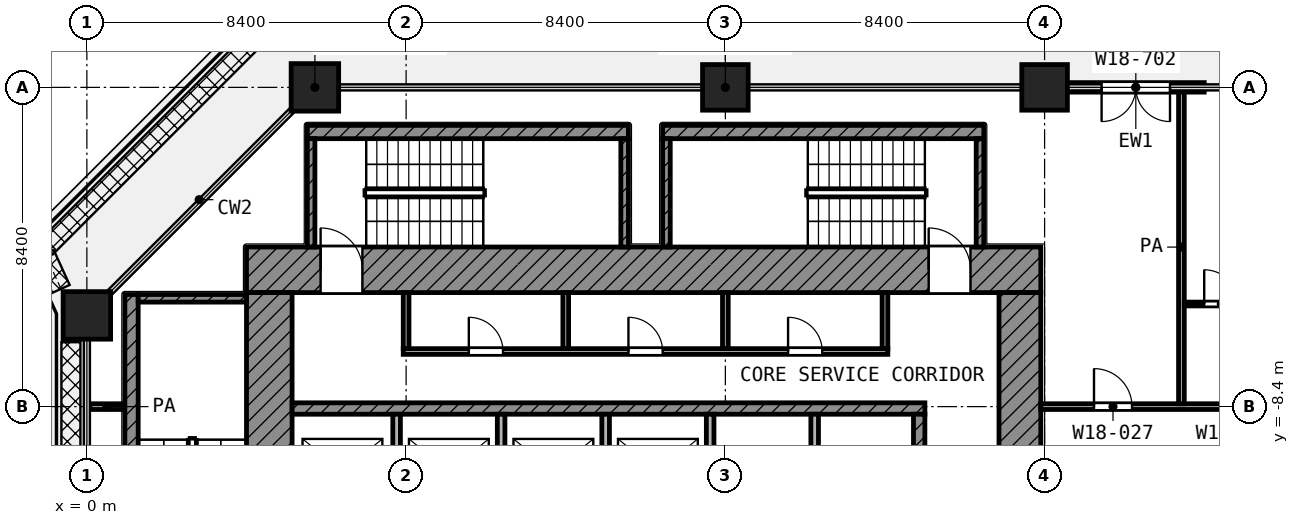
"""IFC4 building model, lengths in metres.
Left out: names, types, materials, properties, quantities, classifications, styles, units other than length and angle.
Written with IfcOpenShell. Run it as: python <this file> out.ifc"""

import sys

from ifc_helpers import new_model, si_unit, direction, frame, frame_2d, origin, origin_2d, place, context, subcontext, project, spatial, rectangle, extrude, element, fill, save


model = new_model("IFC4")
c1 = context("Model", 3, precision=1e-05, world=origin(), true_north=direction((0.0, 1.0)))
c2 = subcontext(c1, "Body", "Model", "MODEL_VIEW")
j1 = project(units=[si_unit("LENGTHUNIT", "METRE"), si_unit("PLANEANGLEUNIT", "RADIAN")], contexts=[c1])
p1 = place(None, origin())
s1 = spatial("IfcSite", under=j1, at=p1, CompositionType="ELEMENT")
p2 = place(p1, origin())
s2 = spatial("IfcBuilding", under=s1, at=p2, CompositionType="ELEMENT")
p3 = place(p2, frame((0.0, 0.0, 81.2)))
s3 = spatial("IfcBuildingStorey", under=s2, at=p3, CompositionType="ELEMENT", Elevation=81.2)
p4 = place(p3, frame((6.0, 0.0, 0.0), z_axis=(0.0, 0.0, 1.0), x_axis=(1.0, 0.0, 0.0)))
e1 = element("IfcColumn", 1, at=p4, inside=s3, PredefinedType="COLUMN", context=c2, shape_type="SweptSolid", body=[
    extrude(rectangle(XDim=1.25, YDim=1.25, at=origin_2d()), origin(), (0.0, 0.0, 1.0), 4.2),
])
for number, where, z_axis, x_axis in (
    (2, (16.8, 0.0, 0.0), (0.0, 0.0, 1.0), (1.0, 0.0, 0.0)),
    (3, (25.2, 0.0, 0.0), (0.0, 0.0, 1.0), (1.0, 0.0, 0.0)),
):
    element("IfcColumn", number, at=place(p3, frame(where, z_axis=z_axis, x_axis=x_axis)), inside=s3, PredefinedType="COLUMN", context=c2, shape_type="SweptSolid", body=[
        extrude(rectangle(XDim=1.2, YDim=1.2, at=origin_2d()), origin(), (0.0, 0.0, 1.0), 4.2),
    ])
p5 = place(p3, frame((0.0, -6.0, 0.0), z_axis=(0.0, 0.0, 1.0), x_axis=(1.0, 0.0, 0.0)))
e4 = element("IfcColumn", 4, at=p5, inside=s3, PredefinedType="COLUMN", context=c2, shape_type="SweptSolid", body=[
    extrude(rectangle(XDim=1.25, YDim=1.25, at=origin_2d()), origin(), (0.0, 0.0, 1.0), 4.2),
])
p6 = place(p3, frame((29.4, 0.0, 0.0), z_axis=(0.0, 0.0, 1.0), x_axis=(-1.0, 0.0, 0.0)))
e5 = element("IfcWall", 5, at=p6, inside=s3, PredefinedType="SOLIDWALL", context=c2, shape_type="SweptSolid", body=[
    extrude(rectangle(XDim=3.6, YDim=0.25, at=frame_2d((1.8, 0.0))), origin(), (0.0, 0.0, 1.0), 3.78),
])
p7 = place(p6, frame((0.9, 0.0, 0.0)))
e6 = element("IfcOpeningElement", 6, at=p7, cuts=e5, PredefinedType="OPENING", context=c2, shape_type="SweptSolid", body=[
    extrude(rectangle(XDim=1.8, YDim=2.1, at=frame_2d((0.9, 1.05))), frame((0.0, 0.135, 0.0), z_axis=(0.0, -1.0, 0.0), x_axis=(1.0, 0.0, 0.0)), (0.0, 0.0, 1.0), 0.27),
])
p8 = place(p3, frame((4.2, -4.8, 0.0), z_axis=(0.0, 0.0, 1.0), x_axis=(1.0, 0.0, 0.0)))
e7 = element("IfcWall", 7, at=p8, inside=s3, PredefinedType="SHEAR", context=c2, shape_type="SweptSolid", body=[
    extrude(rectangle(XDim=20.9, YDim=1.2, at=frame_2d((10.45, 0.0))), origin(), (0.0, 0.0, 1.0), 3.9),
])
p9 = place(p8, frame((1.95, 0.0, 0.0)))
e8 = element("IfcOpeningElement", 8, at=p9, cuts=e7, PredefinedType="OPENING", context=c2, shape_type="SweptSolid", body=[
    extrude(rectangle(XDim=1.1, YDim=2.1, at=frame_2d((0.55, 1.05))), frame((0.0, 0.61, 0.0), z_axis=(0.0, -1.0, 0.0), x_axis=(1.0, 0.0, 0.0)), (0.0, 0.0, 1.0), 1.22),
])
p10 = place(p8, frame((17.95, 0.0, 0.0)))
e9 = element("IfcOpeningElement", 9, at=p10, cuts=e7, PredefinedType="OPENING", context=c2, shape_type="SweptSolid", body=[
    extrude(rectangle(XDim=1.1, YDim=2.1, at=frame_2d((0.55, 1.05))), frame((0.0, 0.61, 0.0), z_axis=(0.0, -1.0, 0.0), x_axis=(1.0, 0.0, 0.0)), (0.0, 0.0, 1.0), 1.22),
])
p11 = place(p3, frame((4.8, -25.1, 0.0), z_axis=(0.0, 0.0, 1.0), x_axis=(0.0, 1.0, 0.0)))
e10 = element("IfcWall", 10, at=p11, inside=s3, PredefinedType="SHEAR", context=c2, shape_type="SweptSolid", body=[
    extrude(rectangle(XDim=19.7, YDim=1.2, at=frame_2d((9.85, 0.0))), origin(), (0.0, 0.0, 1.0), 3.9),
])
p12 = place(p11, frame((11.55, 0.0, 0.0)))
e11 = element("IfcOpeningElement", 11, at=p12, cuts=e10, PredefinedType="OPENING", context=c2, shape_type="SweptSolid", body=[
    extrude(rectangle(XDim=1.1, YDim=2.1, at=frame_2d((0.55, 1.05))), frame((0.0, 0.61, 0.0), z_axis=(0.0, -1.0, 0.0), x_axis=(1.0, 0.0, 0.0)), (0.0, 0.0, 1.0), 1.22),
])
p13 = place(p11, frame((2.25, 0.0, 0.0)))
e12 = element("IfcOpeningElement", 12, at=p13, cuts=e10, PredefinedType="OPENING", context=c2, shape_type="SweptSolid", body=[
    extrude(rectangle(XDim=1.1, YDim=2.1, at=frame_2d((0.55, 1.05))), frame((0.0, 0.61, 0.0), z_axis=(0.0, -1.0, 0.0), x_axis=(1.0, 0.0, 0.0)), (0.0, 0.0, 1.0), 1.22),
])
p14 = place(p3, frame((24.55, -24.0, 0.0), z_axis=(0.0, 0.0, 1.0), x_axis=(0.0, 1.0, 0.0)))
e13 = element("IfcWall", 13, at=p14, inside=s3, PredefinedType="SHEAR", context=c2, shape_type="SweptSolid", body=[
    extrude(rectangle(XDim=18.6, YDim=1.1, at=frame_2d((9.3, 0.0))), origin(), (0.0, 0.0, 1.0), 3.9),
])
p15 = place(p14, frame((10.5, 0.0, 0.0)))
e14 = element("IfcOpeningElement", 14, at=p15, cuts=e13, PredefinedType="OPENING", context=c2, shape_type="SweptSolid", body=[
    extrude(rectangle(XDim=1.8, YDim=2.1, at=frame_2d((0.9, 1.05))), frame((0.0, 0.56, 0.0), z_axis=(0.0, -1.0, 0.0), x_axis=(1.0, 0.0, 0.0)), (0.0, 0.0, 1.0), 1.12),
])
p16 = place(p3, frame((5.4, -8.45, 0.0), z_axis=(0.0, 0.0, 1.0), x_axis=(1.0, 0.0, 0.0)))
e15 = element("IfcWall", 15, at=p16, inside=s3, PredefinedType="SHEAR", context=c2, shape_type="SweptSolid", body=[
    extrude(rectangle(XDim=16.65, YDim=0.3, at=frame_2d((8.325, 0.0))), origin(), (0.0, 0.0, 1.0), 3.9),
])
p17 = place(p3, frame((21.9, -10.95, 0.0), z_axis=(0.0, 0.0, 1.0), x_axis=(0.0, 1.0, 0.0)))
e16 = element("IfcWall", 16, at=p17, inside=s3, PredefinedType="SHEAR", context=c2, shape_type="SweptSolid", body=[
    extrude(rectangle(XDim=2.35, YDim=0.3, at=frame_2d((1.175, 0.0))), origin(), (0.0, 0.0, 1.0), 3.9),
])
for number, where, z_axis, x_axis in (
    (17, (8.15, -10.95, 0.0), (0.0, 0.0, 1.0), (0.0, 1.0, 0.0)),
    (18, (10.9, -10.95, 0.0), (0.0, 0.0, 1.0), (0.0, 1.0, 0.0)),
    (19, (13.65, -10.95, 0.0), (0.0, 0.0, 1.0), (0.0, 1.0, 0.0)),
    (20, (16.4, -10.95, 0.0), (0.0, 0.0, 1.0), (0.0, 1.0, 0.0)),
    (21, (19.15, -10.95, 0.0), (0.0, 0.0, 1.0), (0.0, 1.0, 0.0)),
):
    element("IfcWall", number, at=place(p3, frame(where, z_axis=z_axis, x_axis=x_axis)), inside=s3, PredefinedType="PARTITIONING", context=c2, shape_type="SweptSolid", body=[
        extrude(rectangle(XDim=2.35, YDim=0.2, at=frame_2d((1.175, 0.0))), origin(), (0.0, 0.0, 1.0), 3.9),
    ])
p18 = place(p3, frame((8.325, -6.95, 0.0), z_axis=(0.0, 0.0, 1.0), x_axis=(1.0, 0.0, 0.0)))
e22 = element("IfcWall", 22, at=p18, inside=s3, PredefinedType="PARTITIONING", context=c2, shape_type="SweptSolid", body=[
    extrude(rectangle(XDim=12.75, YDim=0.15, at=frame_2d((6.375, 0.0))), origin(), (0.0, 0.0, 1.0), 3.9),
])
p19 = place(p18, frame((1.725, 0.0, 0.0)))
e23 = element("IfcOpeningElement", 23, at=p19, cuts=e22, PredefinedType="OPENING", context=c2, shape_type="SweptSolid", body=[
    extrude(rectangle(XDim=0.9, YDim=2.1, at=frame_2d((0.45, 1.05))), frame((0.0, 0.085, 0.0), z_axis=(0.0, -1.0, 0.0), x_axis=(1.0, 0.0, 0.0)), (0.0, 0.0, 1.0), 0.17),
])
p20 = place(p18, frame((5.925, 0.0, 0.0)))
e24 = element("IfcOpeningElement", 24, at=p20, cuts=e22, PredefinedType="OPENING", context=c2, shape_type="SweptSolid", body=[
    extrude(rectangle(XDim=0.9, YDim=2.1, at=frame_2d((0.45, 1.05))), frame((0.0, 0.085, 0.0), z_axis=(0.0, -1.0, 0.0), x_axis=(1.0, 0.0, 0.0)), (0.0, 0.0, 1.0), 0.17),
])
p21 = place(p18, frame((10.125, 0.0, 0.0)))
e25 = element("IfcOpeningElement", 25, at=p21, cuts=e22, PredefinedType="OPENING", context=c2, shape_type="SweptSolid", body=[
    extrude(rectangle(XDim=0.9, YDim=2.1, at=frame_2d((0.45, 1.05))), frame((0.0, 0.085, 0.0), z_axis=(0.0, -1.0, 0.0), x_axis=(1.0, 0.0, 0.0)), (0.0, 0.0, 1.0), 0.17),
])
for number, where, z_axis, x_axis in (
    (26, (8.4, -6.875, 0.0), (0.0, 0.0, 1.0), (0.0, 1.0, 0.0)),
    (27, (12.6, -6.875, 0.0), (0.0, 0.0, 1.0), (0.0, 1.0, 0.0)),
    (28, (16.8, -6.875, 0.0), (0.0, 0.0, 1.0), (0.0, 1.0, 0.0)),
    (29, (21.0, -6.875, 0.0), (0.0, 0.0, 1.0), (0.0, 1.0, 0.0)),
):
    element("IfcWall", number, at=place(p3, frame(where, z_axis=z_axis, x_axis=x_axis)), inside=s3, PredefinedType="PARTITIONING", context=c2, shape_type="SweptSolid", body=[
        extrude(rectangle(XDim=1.475, YDim=0.15, at=frame_2d((0.738, 0.0))), origin(), (0.0, 0.0, 1.0), 3.9),
    ])
p22 = place(p3, frame((1.175, -13.9, 0.0), z_axis=(0.0, 0.0, 1.0), x_axis=(0.0, 1.0, 0.0)))
e30 = element("IfcWall", 30, at=p22, inside=s3, PredefinedType="SHEAR", context=c2, shape_type="SweptSolid", body=[
    extrude(rectangle(XDim=8.45, YDim=0.35, at=frame_2d((4.225, 0.0))), origin(), (0.0, 0.0, 1.0), 3.9),
])
p23 = place(p3, frame((1.35, -5.55, 0.0), z_axis=(0.0, 0.0, 1.0), x_axis=(1.0, 0.0, 0.0)))
e31 = element("IfcWall", 31, at=p23, inside=s3, PredefinedType="SHEAR", context=c2, shape_type="SweptSolid", body=[
    extrude(rectangle(XDim=2.85, YDim=0.2, at=frame_2d((1.425, 0.0))), origin(), (0.0, 0.0, 1.0), 3.9),
])
p24 = place(p3, frame((5.8, -1.175, 0.0), z_axis=(0.0, 0.0, 1.0), x_axis=(1.0, 0.0, 0.0)))
e32 = element("IfcWall", 32, at=p24, inside=s3, PredefinedType="SHEAR", context=c2, shape_type="SweptSolid", body=[
    extrude(rectangle(XDim=8.45, YDim=0.35, at=frame_2d((4.225, 0.0))), origin(), (0.0, 0.0, 1.0), 3.9),
])
for number, where, z_axis, x_axis in (
    (33, (5.9, -4.2, 0.0), (0.0, 0.0, 1.0), (0.0, 1.0, 0.0)),
    (34, (14.15, -4.2, 0.0), (0.0, 0.0, 1.0), (0.0, 1.0, 0.0)),
):
    element("IfcWall", number, at=place(p3, frame(where, z_axis=z_axis, x_axis=x_axis)), inside=s3, PredefinedType="SHEAR", context=c2, shape_type="SweptSolid", body=[
        extrude(rectangle(XDim=2.85, YDim=0.2, at=frame_2d((1.425, 0.0))), origin(), (0.0, 0.0, 1.0), 3.9),
    ])
p25 = place(p3, frame((15.15, -1.175, 0.0), z_axis=(0.0, 0.0, 1.0), x_axis=(1.0, 0.0, 0.0)))
e35 = element("IfcWall", 35, at=p25, inside=s3, PredefinedType="SHEAR", context=c2, shape_type="SweptSolid", body=[
    extrude(rectangle(XDim=8.45, YDim=0.35, at=frame_2d((4.225, 0.0))), origin(), (0.0, 0.0, 1.0), 3.9),
])
for number, where, z_axis, x_axis in (
    (36, (15.25, -4.2, 0.0), (0.0, 0.0, 1.0), (0.0, 1.0, 0.0)),
    (37, (23.5, -4.2, 0.0), (0.0, 0.0, 1.0), (0.0, 1.0, 0.0)),
):
    element("IfcWall", number, at=place(p3, frame(where, z_axis=z_axis, x_axis=x_axis)), inside=s3, PredefinedType="SHEAR", context=c2, shape_type="SweptSolid", body=[
        extrude(rectangle(XDim=2.85, YDim=0.2, at=frame_2d((1.425, 0.0))), origin(), (0.0, 0.0, 1.0), 3.9),
    ])
p26 = place(p3, frame((28.875, -5.7, 0.0), z_axis=(0.0, 0.0, 1.0), x_axis=(1.0, 0.0, 0.0)))
e38 = element("IfcWall", 38, at=p26, inside=s3, PredefinedType="PARTITIONING", context=c2, shape_type="SweptSolid", body=[
    extrude(rectangle(XDim=1.975, YDim=0.1, at=frame_2d((0.988, 0.0))), origin(), (0.0, 0.0, 1.0), 3.9),
])
p27 = place(p26, frame((0.525, 0.0, 0.0)))
e39 = element("IfcOpeningElement", 39, at=p27, cuts=e38, PredefinedType="OPENING", context=c2, shape_type="SweptSolid", body=[
    extrude(rectangle(XDim=0.9, YDim=2.1, at=frame_2d((0.45, 1.05))), frame((0.0, 0.06, 0.0), z_axis=(0.0, -1.0, 0.0), x_axis=(1.0, 0.0, 0.0)), (0.0, 0.0, 1.0), 0.12),
])
p28 = place(p3, frame((0.08, -8.4, 0.0), z_axis=(0.0, 0.0, 1.0), x_axis=(1.0, 0.0, 0.0)))
e40 = element("IfcWall", 40, at=p28, inside=s3, PredefinedType="PARTITIONING", context=c2, shape_type="SweptSolid", body=[
    extrude(rectangle(XDim=0.89, YDim=0.15, at=frame_2d((0.445, 0.0))), origin(), (0.0, 0.0, 1.0), 3.9),
])
p29 = place(p3, frame((25.1, -8.4, 0.0), z_axis=(0.0, 0.0, 1.0), x_axis=(1.0, 0.0, 0.0)))
e41 = element("IfcWall", 41, at=p29, inside=s3, PredefinedType="PARTITIONING", context=c2, shape_type="SweptSolid", body=[
    extrude(rectangle(XDim=14.932, YDim=0.15, at=frame_2d((7.466, 0.0))), origin(), (0.0, 0.0, 1.0), 3.9),
])
p30 = place(p29, frame((1.4, 0.0, 0.0)))
e42 = element("IfcOpeningElement", 42, at=p30, cuts=e41, PredefinedType="OPENING", context=c2, shape_type="SweptSolid", body=[
    extrude(rectangle(XDim=1.0, YDim=2.1, at=frame_2d((0.5, 1.05))), frame((0.0, 0.085, 0.0), z_axis=(0.0, -1.0, 0.0), x_axis=(1.0, 0.0, 0.0)), (0.0, 0.0, 1.0), 0.17),
])
p31 = place(p29, frame((6.1, 0.0, 0.0)))
e43 = element("IfcOpeningElement", 43, at=p31, cuts=e41, PredefinedType="OPENING", context=c2, shape_type="SweptSolid", body=[
    extrude(rectangle(XDim=1.2, YDim=2.1, at=frame_2d((0.6, 1.05))), frame((0.0, 0.085, 0.0), z_axis=(0.0, -1.0, 0.0), x_axis=(1.0, 0.0, 0.0)), (0.0, 0.0, 1.0), 0.17),
])
p32 = place(p29, frame((9.2, 0.0, 0.0)))
e44 = element("IfcOpeningElement", 44, at=p32, cuts=e41, PredefinedType="OPENING", context=c2, shape_type="SweptSolid", body=[
    extrude(rectangle(XDim=1.2, YDim=2.1, at=frame_2d((0.6, 1.05))), frame((0.0, 0.085, 0.0), z_axis=(0.0, -1.0, 0.0), x_axis=(1.0, 0.0, 0.0)), (0.0, 0.0, 1.0), 0.17),
])
p33 = place(p3, frame((28.8, -8.325, 0.0), z_axis=(0.0, 0.0, 1.0), x_axis=(0.0, 1.0, 0.0)))
e45 = element("IfcWall", 45, at=p33, inside=s3, PredefinedType="PARTITIONING", context=c2, shape_type="SweptSolid", body=[
    extrude(rectangle(XDim=8.245, YDim=0.15, at=frame_2d((4.123, 0.0))), origin(), (0.0, 0.0, 1.0), 3.9),
])
p34 = place(p7, origin())
e46 = element("IfcDoor", 46, at=p34, inside=s3, OperationType="DOUBLE_DOOR_SINGLE_SWING", PredefinedType="DOOR", context=c2, shape_type="SweptSolid", body=[
    extrude(rectangle(XDim=1.8, YDim=2.1, at=frame_2d((0.9, 1.05))), frame((0.0, 0.025, 0.0), z_axis=(0.0, -1.0, 0.0), x_axis=(1.0, 0.0, 0.0)), (0.0, 0.0, 1.0), 0.05),
])
fill(e6, e46)
p35 = place(p9, origin())
e47 = element("IfcDoor", 47, at=p35, inside=s3, OperationType="SINGLE_SWING_LEFT", PredefinedType="DOOR", context=c2, shape_type="SweptSolid", body=[
    extrude(rectangle(XDim=1.1, YDim=2.1, at=frame_2d((0.55, 1.05))), frame((0.0, 0.025, 0.0), z_axis=(0.0, -1.0, 0.0), x_axis=(1.0, 0.0, 0.0)), (0.0, 0.0, 1.0), 0.05),
])
fill(e8, e47)
p36 = place(p10, origin())
e48 = element("IfcDoor", 48, at=p36, inside=s3, OperationType="SINGLE_SWING_LEFT", PredefinedType="DOOR", context=c2, shape_type="SweptSolid", body=[
    extrude(rectangle(XDim=1.1, YDim=2.1, at=frame_2d((0.55, 1.05))), frame((0.0, 0.025, 0.0), z_axis=(0.0, -1.0, 0.0), x_axis=(1.0, 0.0, 0.0)), (0.0, 0.0, 1.0), 0.05),
])
fill(e9, e48)
p37 = place(p19, origin())
e49 = element("IfcDoor", 49, at=p37, inside=s3, OperationType="SINGLE_SWING_LEFT", PredefinedType="DOOR", context=c2, shape_type="SweptSolid", body=[
    extrude(rectangle(XDim=0.9, YDim=2.1, at=frame_2d((0.45, 1.05))), frame((0.0, 0.025, 0.0), z_axis=(0.0, -1.0, 0.0), x_axis=(1.0, 0.0, 0.0)), (0.0, 0.0, 1.0), 0.05),
])
fill(e23, e49)
p38 = place(p20, origin())
e50 = element("IfcDoor", 50, at=p38, inside=s3, OperationType="SINGLE_SWING_LEFT", PredefinedType="DOOR", context=c2, shape_type="SweptSolid", body=[
    extrude(rectangle(XDim=0.9, YDim=2.1, at=frame_2d((0.45, 1.05))), frame((0.0, 0.025, 0.0), z_axis=(0.0, -1.0, 0.0), x_axis=(1.0, 0.0, 0.0)), (0.0, 0.0, 1.0), 0.05),
])
fill(e24, e50)
p39 = place(p21, origin())
e51 = element("IfcDoor", 51, at=p39, inside=s3, OperationType="SINGLE_SWING_LEFT", PredefinedType="DOOR", context=c2, shape_type="SweptSolid", body=[
    extrude(rectangle(XDim=0.9, YDim=2.1, at=frame_2d((0.45, 1.05))), frame((0.0, 0.025, 0.0), z_axis=(0.0, -1.0, 0.0), x_axis=(1.0, 0.0, 0.0)), (0.0, 0.0, 1.0), 0.05),
])
fill(e25, e51)
p40 = place(p30, origin())
e52 = element("IfcDoor", 52, at=p40, inside=s3, OperationType="SINGLE_SWING_LEFT", PredefinedType="DOOR", context=c2, shape_type="SweptSolid", body=[
    extrude(rectangle(XDim=1.0, YDim=2.1, at=frame_2d((0.5, 1.05))), frame((0.0, 0.025, 0.0), z_axis=(0.0, -1.0, 0.0), x_axis=(1.0, 0.0, 0.0)), (0.0, 0.0, 1.0), 0.05),
])
fill(e42, e52)
p41 = place(p27, origin())
e53 = element("IfcDoor", 53, at=p41, inside=s3, OperationType="SINGLE_SWING_LEFT", PredefinedType="DOOR", context=c2, shape_type="SweptSolid", body=[
    extrude(rectangle(XDim=0.9, YDim=2.1, at=frame_2d((0.45, 1.05))), frame((0.0, 0.025, 0.0), z_axis=(0.0, -1.0, 0.0), x_axis=(1.0, 0.0, 0.0)), (0.0, 0.0, 1.0), 0.05),
])
fill(e39, e53)
save(model, sys.argv[1])
